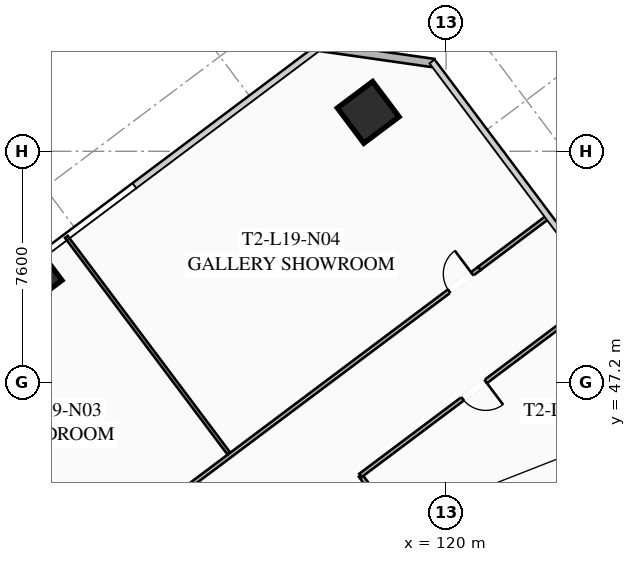
"""IFC4 building model, lengths in metres.
Left out: names, types, materials, properties, quantities, classifications, styles, units other than length and angle.
Written with IfcOpenShell. Run it as: python <this file> out.ifc"""

import sys

from ifc_helpers import new_model, si_unit, direction, frame, frame_2d, origin, origin_2d, place, context, subcontext, project, spatial, rectangle, hollow_rectangle, extrude, element, fill, save


model = new_model("IFC4")
c1 = context("Model", 3, precision=1e-05, world=origin(), true_north=direction((0.0, 1.0)))
c2 = subcontext(c1, "Body", "Model", "MODEL_VIEW")
j1 = project(units=[si_unit("LENGTHUNIT", "METRE"), si_unit("PLANEANGLEUNIT", "RADIAN")], contexts=[c1])
p1 = place(None, origin())
s1 = spatial("IfcSite", under=j1, at=p1, CompositionType="ELEMENT")
p2 = place(p1, origin())
s2 = spatial("IfcBuilding", under=s1, at=p2, CompositionType="ELEMENT")
p3 = place(p2, frame((0.0, 0.0, 74.3)))
s3 = spatial("IfcBuildingStorey", under=s2, at=p3, CompositionType="ELEMENT", Elevation=74.3)
p4 = place(p3, frame((117.44, 56.08, 0.0), z_axis=(0.0, 0.0, 1.0), x_axis=(0.799999996291, 0.600000004945, 0.0)))
e1 = element("IfcColumn", 1, at=p4, inside=s3, PredefinedType="COLUMN", context=c2, shape_type="SweptSolid", body=[
    extrude(hollow_rectangle(XDim=1.45, YDim=1.45, WallThickness=0.055, at=origin_2d()), origin(), (0.0, 0.0, 1.0), 3.35),
])
p5 = place(p3, frame((106.77, 50.64, 0.0), z_axis=(0.0, 0.0, 1.0), x_axis=(0.799999996291, 0.600000004945, 0.0)))
e2 = element("IfcColumn", 2, at=p5, inside=s3, PredefinedType="COLUMN", context=c2, shape_type="SweptSolid", body=[
    extrude(hollow_rectangle(XDim=0.85, YDim=0.85, WallThickness=0.035, at=origin_2d()), origin(), (0.0, 0.0, 1.0), 3.35),
])
p6 = place(p3, frame((115.82, 58.24, 0.0), z_axis=(0.0, 0.0, 1.0), x_axis=(0.989948214866, -0.141430307517, 0.0)))
e3 = element("IfcWall", 3, at=p6, inside=s3, PredefinedType="SOLIDWALL", context=c2, shape_type="SweptSolid", body=[
    extrude(rectangle(XDim=3.818, YDim=0.28, at=frame_2d((1.909, 0.0))), origin(), (0.0, 0.0, 1.0), 3.35),
])
p7 = place(p3, frame((119.824, 40.618, 0.0), z_axis=(0.0, 0.0, 1.0), x_axis=(-0.599982243973, 0.800013316712, 0.0)))
e4 = element("IfcWall", 4, at=p7, inside=s3, PredefinedType="PARTITIONING", context=c2, shape_type="SweptSolid", body=[
    extrude(rectangle(XDim=4.4, YDim=0.135, at=frame_2d((2.2, 0.0))), origin(), (0.0, 0.0, 1.0), 2.703),
])
p8 = place(p3, frame((98.516, 34.012, 0.0), z_axis=(0.0, 0.0, 1.0), x_axis=(0.8, 0.6, 0.0)))
e5 = element("IfcWall", 5, at=p8, inside=s3, PredefinedType="PARTITIONING", context=c2, shape_type="SweptSolid", body=[
    extrude(rectangle(XDim=28.23, YDim=0.135, at=frame_2d((14.115, 0.0))), origin(), (0.0, 0.0, 1.0), 2.703),
])
p9 = place(p8, frame((0.3, 0.0, 0.0)))
e6 = element("IfcOpeningElement", 6, at=p9, cuts=e5, PredefinedType="OPENING", context=c2, shape_type="SweptSolid", body=[
    extrude(rectangle(XDim=0.95, YDim=2.05, at=frame_2d((0.475, 1.025))), frame((0.0, 0.077, 0.0), z_axis=(0.0, -1.0, 0.0), x_axis=(1.0, 0.0, 0.0)), (0.0, 0.0, 1.0), 0.155),
])
p10 = place(p8, frame((6.84, 0.0, 0.0)))
e7 = element("IfcOpeningElement", 7, at=p10, cuts=e5, PredefinedType="OPENING", context=c2, shape_type="SweptSolid", body=[
    extrude(rectangle(XDim=0.95, YDim=2.05, at=frame_2d((0.475, 1.025))), frame((0.0, 0.077, 0.0), z_axis=(0.0, -1.0, 0.0), x_axis=(1.0, 0.0, 0.0)), (0.0, 0.0, 1.0), 0.155),
])
p11 = place(p8, frame((10.863, 0.0, 0.0)))
e8 = element("IfcOpeningElement", 8, at=p11, cuts=e5, PredefinedType="OPENING", context=c2, shape_type="SweptSolid", body=[
    extrude(rectangle(XDim=0.95, YDim=2.05, at=frame_2d((0.475, 1.025))), frame((0.0, 0.077, 0.0), z_axis=(0.0, -1.0, 0.0), x_axis=(1.0, 0.0, 0.0)), (0.0, 0.0, 1.0), 0.155),
])
p12 = place(p8, frame((26.98, 0.0, 0.0)))
e9 = element("IfcOpeningElement", 9, at=p12, cuts=e5, PredefinedType="OPENING", context=c2, shape_type="SweptSolid", body=[
    extrude(rectangle(XDim=0.95, YDim=2.05, at=frame_2d((0.475, 1.025))), frame((0.0, 0.077, 0.0), z_axis=(0.0, -1.0, 0.0), x_axis=(1.0, 0.0, 0.0)), (0.0, 0.0, 1.0), 0.155),
])
p13 = place(p3, frame((121.1, 50.95, 0.0), z_axis=(0.0, 0.0, 1.0), x_axis=(0.799989647378, 0.600013803248, 0.0)))
e10 = element("IfcWall", 10, at=p13, inside=s3, PredefinedType="PARTITIONING", context=c2, shape_type="SweptSolid", body=[
    extrude(rectangle(XDim=2.83, YDim=0.135, at=frame_2d((1.415, 0.0))), origin(), (0.0, 0.0, 1.0), 2.703),
])
p14 = place(p3, frame((112.852, 44.864, 0.0), z_axis=(0.0, 0.0, 1.0), x_axis=(-0.600013167126, 0.799990124486, 0.0)))
e11 = element("IfcWall", 11, at=p14, inside=s3, PredefinedType="PARTITIONING", context=c2, shape_type="SweptSolid", body=[
    extrude(rectangle(XDim=8.9, YDim=0.11, at=frame_2d((4.45, 0.0))), origin(), (0.0, 0.0, 1.0), 2.703),
])
p15 = place(p3, frame((125.224, 50.168, 0.0), z_axis=(0.0, 0.0, 1.0), x_axis=(-0.8, -0.6, 0.0)))
e12 = element("IfcWall", 12, at=p15, inside=s3, PredefinedType="PARTITIONING", context=c2, shape_type="SweptSolid", body=[
    extrude(rectangle(XDim=10.05, YDim=0.135, at=frame_2d((5.025, 0.0))), origin(), (0.0, 0.0, 1.0), 2.703),
])
p16 = place(p15, frame((4.9, 0.0, 0.0)))
e13 = element("IfcOpeningElement", 13, at=p16, cuts=e12, PredefinedType="OPENING", context=c2, shape_type="SweptSolid", body=[
    extrude(rectangle(XDim=0.95, YDim=2.05, at=frame_2d((0.475, 1.025))), frame((0.0, 0.077, 0.0), z_axis=(0.0, -1.0, 0.0), x_axis=(1.0, 0.0, 0.0)), (0.0, 0.0, 1.0), 0.155),
])
p17 = place(p3, frame((127.864, 46.648, 0.0), z_axis=(0.0, 0.0, 1.0), x_axis=(-0.800007145523, -0.599990472518, 0.0)))
e14 = element("IfcWall", 14, at=p17, inside=s3, PredefinedType="PARTITIONING", context=c2, shape_type="SweptSolid", body=[
    extrude(rectangle(XDim=8.2, YDim=0.11, at=frame_2d((4.1, 0.0))), origin(), (0.0, 0.0, 1.0), 2.703),
])
p18 = place(p12, origin())
e15 = element("IfcDoor", 15, at=p18, inside=s3, OperationType="SINGLE_SWING_RIGHT", PredefinedType="DOOR", context=c2, shape_type="SweptSolid", body=[
    extrude(rectangle(XDim=0.95, YDim=2.05, at=frame_2d((0.475, 1.025))), frame((0.0, 0.025, 0.0), z_axis=(0.0, -1.0, 0.0), x_axis=(1.0, 0.0, 0.0)), (0.0, 0.0, 1.0), 0.05),
])
fill(e9, e15)
p19 = place(p16, origin())
e16 = element("IfcDoor", 16, at=p19, inside=s3, OperationType="SINGLE_SWING_LEFT", PredefinedType="DOOR", context=c2, shape_type="SweptSolid", body=[
    extrude(rectangle(XDim=0.95, YDim=2.05, at=frame_2d((0.475, 1.025))), frame((0.0, 0.025, 0.0), z_axis=(0.0, -1.0, 0.0), x_axis=(1.0, 0.0, 0.0)), (0.0, 0.0, 1.0), 0.05),
])
fill(e13, e16)
save(model, sys.argv[1])
